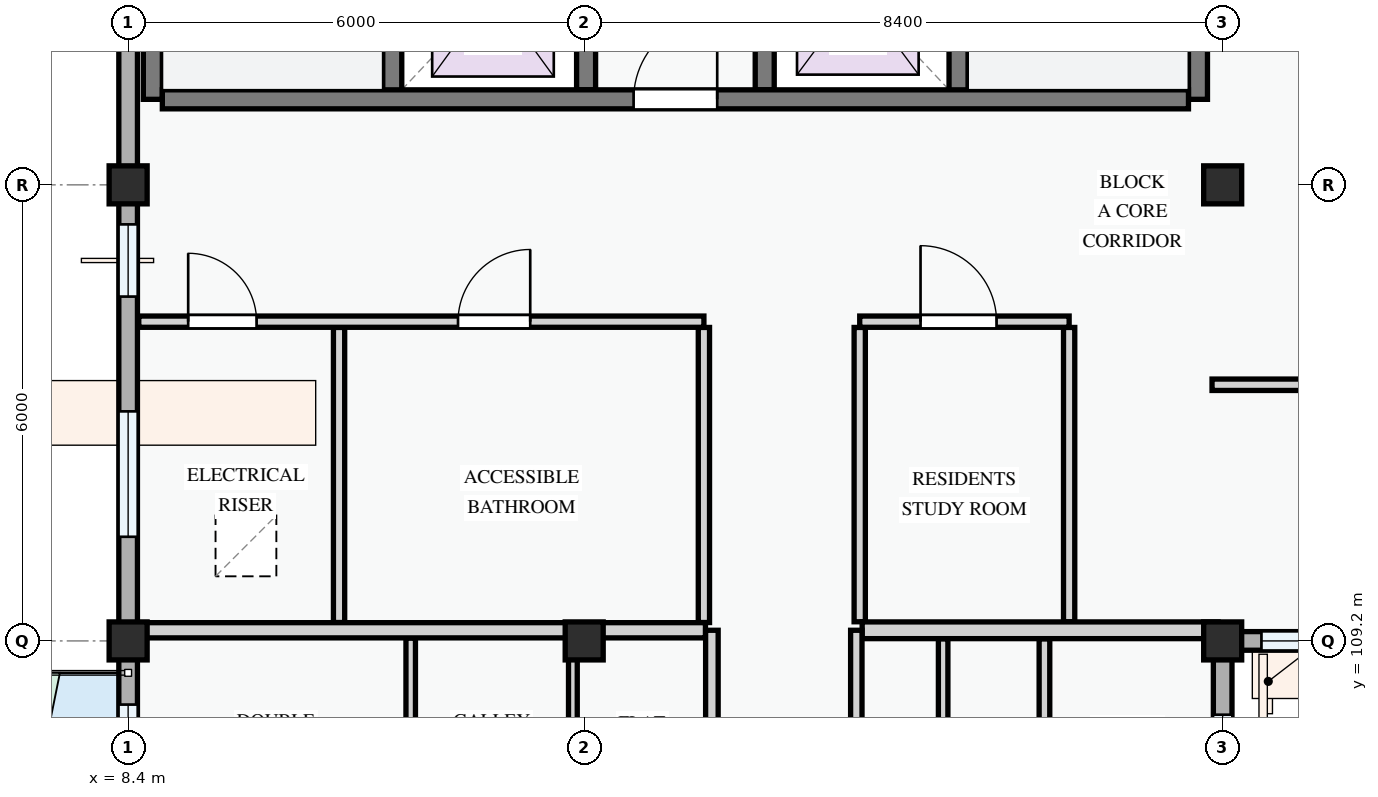
"""IFC4 building model, lengths in metres.
Left out: names, types, materials, properties, quantities, classifications, styles, units other than length and angle.
Written with IfcOpenShell. Run it as: python <this file> out.ifc"""

import sys

from ifc_helpers import new_model, si_unit, direction, frame, frame_2d, origin, origin_2d, place, context, subcontext, project, spatial, rectangle, extrude, element, fill, save


model = new_model("IFC4")
c1 = context("Model", 3, precision=1e-05, world=origin(), true_north=direction((0.0, 1.0)))
c2 = subcontext(c1, "Body", "Model", "MODEL_VIEW")
j1 = project(units=[si_unit("LENGTHUNIT", "METRE"), si_unit("PLANEANGLEUNIT", "RADIAN")], contexts=[c1])
p1 = place(None, origin())
s1 = spatial("IfcSite", under=j1, at=p1, CompositionType="ELEMENT")
p2 = place(p1, origin())
s2 = spatial("IfcBuilding", under=s1, at=p2, CompositionType="ELEMENT")
p3 = place(p2, frame((0.0, 0.0, 41.1)))
s3 = spatial("IfcBuildingStorey", under=s2, at=p3, CompositionType="ELEMENT", Elevation=41.1)
for number, where, z_axis, x_axis in (
    (1, (8.4, 109.2, 0.0), (0.0, 0.0, 1.0), (1.0, 0.0, 0.0)),
    (2, (8.4, 115.2, 0.0), (0.0, 0.0, 1.0), (1.0, 0.0, 0.0)),
    (3, (14.4, 109.2, 0.0), (0.0, 0.0, 1.0), (1.0, 0.0, 0.0)),
    (4, (22.8, 109.2, 0.0), (0.0, 0.0, 1.0), (1.0, 0.0, 0.0)),
    (5, (22.8, 115.2, 0.0), (0.0, 0.0, 1.0), (1.0, 0.0, 0.0)),
):
    element("IfcColumn", number, at=place(p3, frame(where, z_axis=z_axis, x_axis=x_axis)), inside=s3, PredefinedType="COLUMN", context=c2, shape_type="SweptSolid", body=[
        extrude(rectangle(XDim=0.5, YDim=0.5, at=origin_2d()), origin(), (0.0, 0.0, 1.0), 3.3),
    ])
p4 = place(p3, frame((22.8, 109.2, 0.0), z_axis=(0.0, 0.0, 1.0), x_axis=(1.0, 0.0, 0.0)))
e6 = element("IfcWall", 6, at=p4, inside=s3, PredefinedType="STANDARD", context=c2, shape_type="SweptSolid", body=[
    extrude(rectangle(XDim=6.0, YDim=0.245, at=frame_2d((3.0, 0.0))), origin(), (0.0, 0.0, 1.0), 2.525),
])
p5 = place(p4, frame((0.51, 0.0, 0.78)))
e7 = element("IfcOpeningElement", 7, at=p5, cuts=e6, PredefinedType="OPENING", context=c2, shape_type="SweptSolid", body=[
    extrude(rectangle(XDim=1.52, YDim=1.42, at=frame_2d((0.76, 0.71))), frame((0.0, 0.133, 0.0), z_axis=(0.0, -1.0, 0.0), x_axis=(1.0, 0.0, 0.0)), (0.0, 0.0, 1.0), 0.265),
])
p6 = place(p4, frame((2.955, 0.0, 0.78)))
e8 = element("IfcOpeningElement", 8, at=p6, cuts=e6, PredefinedType="OPENING", context=c2, shape_type="SweptSolid", body=[
    extrude(rectangle(XDim=2.25, YDim=1.6, at=frame_2d((1.125, 0.8))), frame((0.0, 0.133, 0.0), z_axis=(0.0, -1.0, 0.0), x_axis=(1.0, 0.0, 0.0)), (0.0, 0.0, 1.0), 0.265),
])
p7 = place(p3, frame((8.4, 123.6, 0.0), z_axis=(0.0, 0.0, 1.0), x_axis=(0.0, -1.0, 0.0)))
e9 = element("IfcWall", 9, at=p7, inside=s3, PredefinedType="STANDARD", context=c2, shape_type="SweptSolid", body=[
    extrude(rectangle(XDim=8.4, YDim=0.245, at=frame_2d((4.2, 0.0))), origin(), (0.0, 0.0, 1.0), 2.345),
])
p8 = place(p7, frame((1.296, 0.0, 0.78)))
e10 = element("IfcOpeningElement", 10, at=p8, cuts=e9, PredefinedType="OPENING", context=c2, shape_type="SweptSolid", body=[
    extrude(rectangle(XDim=1.4, YDim=1.45, at=frame_2d((0.7, 0.725))), frame((0.0, 0.133, 0.0), z_axis=(0.0, -1.0, 0.0), x_axis=(1.0, 0.0, 0.0)), (0.0, 0.0, 1.0), 0.265),
])
p9 = place(p7, frame((4.844, 0.0, 0.78)))
e11 = element("IfcOpeningElement", 11, at=p9, cuts=e9, PredefinedType="OPENING", context=c2, shape_type="SweptSolid", body=[
    extrude(rectangle(XDim=1.25, YDim=1.45, at=frame_2d((0.625, 0.725))), frame((0.0, 0.133, 0.0), z_axis=(0.0, -1.0, 0.0), x_axis=(1.0, 0.0, 0.0)), (0.0, 0.0, 1.0), 0.265),
])
p10 = place(p3, frame((8.4, 115.2, 0.0), z_axis=(0.0, 0.0, 1.0), x_axis=(0.0, -1.0, 0.0)))
e12 = element("IfcWall", 12, at=p10, inside=s3, PredefinedType="STANDARD", context=c2, shape_type="SweptSolid", body=[
    extrude(rectangle(XDim=6.0, YDim=0.245, at=frame_2d((3.0, 0.0))), origin(), (0.0, 0.0, 1.0), 2.445),
])
p11 = place(p10, frame((0.52, 0.0, 0.78)))
e13 = element("IfcOpeningElement", 13, at=p11, cuts=e12, PredefinedType="OPENING", context=c2, shape_type="SweptSolid", body=[
    extrude(rectangle(XDim=0.95, YDim=1.15, at=frame_2d((0.475, 0.575))), frame((0.0, 0.133, 0.0), z_axis=(0.0, -1.0, 0.0), x_axis=(1.0, 0.0, 0.0)), (0.0, 0.0, 1.0), 0.265),
])
p12 = place(p10, frame((2.98, 0.0, 0.78)))
e14 = element("IfcOpeningElement", 14, at=p12, cuts=e12, PredefinedType="OPENING", context=c2, shape_type="SweptSolid", body=[
    extrude(rectangle(XDim=1.65, YDim=1.5, at=frame_2d((0.825, 0.75))), frame((0.0, 0.133, 0.0), z_axis=(0.0, -1.0, 0.0), x_axis=(1.0, 0.0, 0.0)), (0.0, 0.0, 1.0), 0.265),
])
p13 = place(p3, frame((8.4, 109.2, 0.0), z_axis=(0.0, 0.0, 1.0), x_axis=(0.0, -1.0, 0.0)))
e15 = element("IfcWall", 15, at=p13, inside=s3, PredefinedType="STANDARD", context=c2, shape_type="SweptSolid", body=[
    extrude(rectangle(XDim=8.4, YDim=0.245, at=frame_2d((4.2, 0.0))), origin(), (0.0, 0.0, 1.0), 2.345),
])
p14 = place(p13, frame((3.595, 0.0, 0.0)))
e16 = element("IfcOpeningElement", 16, at=p14, cuts=e15, PredefinedType="OPENING", context=c2, shape_type="SweptSolid", body=[
    extrude(rectangle(XDim=1.05, YDim=2.15, at=frame_2d((0.525, 1.075))), frame((0.0, 0.133, 0.0), z_axis=(0.0, -1.0, 0.0), x_axis=(1.0, 0.0, 0.0)), (0.0, 0.0, 1.0), 0.265),
])
p15 = place(p13, frame((0.837, 0.0, 0.78)))
e17 = element("IfcOpeningElement", 17, at=p15, cuts=e15, PredefinedType="OPENING", context=c2, shape_type="SweptSolid", body=[
    extrude(rectangle(XDim=1.78, YDim=1.42, at=frame_2d((0.89, 0.71))), frame((0.0, 0.133, 0.0), z_axis=(0.0, -1.0, 0.0), x_axis=(1.0, 0.0, 0.0)), (0.0, 0.0, 1.0), 0.265),
])
p16 = place(p13, frame((5.133, 0.0, 0.78)))
e18 = element("IfcOpeningElement", 18, at=p16, cuts=e15, PredefinedType="OPENING", context=c2, shape_type="SweptSolid", body=[
    extrude(rectangle(XDim=1.1, YDim=1.3, at=frame_2d((0.55, 0.65))), frame((0.0, 0.133, 0.0), z_axis=(0.0, -1.0, 0.0), x_axis=(1.0, 0.0, 0.0)), (0.0, 0.0, 1.0), 0.265),
])
p17 = place(p13, frame((6.99, 0.0, 0.78)))
e19 = element("IfcOpeningElement", 19, at=p17, cuts=e15, PredefinedType="OPENING", context=c2, shape_type="SweptSolid", body=[
    extrude(rectangle(XDim=0.9, YDim=1.2, at=frame_2d((0.45, 0.6))), frame((0.0, 0.133, 0.0), z_axis=(0.0, -1.0, 0.0), x_axis=(1.0, 0.0, 0.0)), (0.0, 0.0, 1.0), 0.265),
])
p18 = place(p3, frame((22.8, 100.8, 0.0), z_axis=(0.0, 0.0, 1.0), x_axis=(0.0, 1.0, 0.0)))
e20 = element("IfcWall", 20, at=p18, inside=s3, PredefinedType="STANDARD", context=c2, shape_type="SweptSolid", body=[
    extrude(rectangle(XDim=8.4, YDim=0.245, at=frame_2d((4.2, 0.0))), origin(), (0.0, 0.0, 1.0), 2.425),
])
p19 = place(p18, frame((0.51, 0.0, 0.78)))
e21 = element("IfcOpeningElement", 21, at=p19, cuts=e20, PredefinedType="OPENING", context=c2, shape_type="SweptSolid", body=[
    extrude(rectangle(XDim=0.9, YDim=1.2, at=frame_2d((0.45, 0.6))), frame((0.0, 0.133, 0.0), z_axis=(0.0, -1.0, 0.0), x_axis=(1.0, 0.0, 0.0)), (0.0, 0.0, 1.0), 0.265),
])
p20 = place(p18, frame((2.764, 0.0, 0.78)))
e22 = element("IfcOpeningElement", 22, at=p20, cuts=e20, PredefinedType="OPENING", context=c2, shape_type="SweptSolid", body=[
    extrude(rectangle(XDim=1.2, YDim=1.5, at=frame_2d((0.6, 0.75))), frame((0.0, 0.133, 0.0), z_axis=(0.0, -1.0, 0.0), x_axis=(1.0, 0.0, 0.0)), (0.0, 0.0, 1.0), 0.265),
])
p21 = place(p18, frame((5.779, 0.0, 0.78)))
e23 = element("IfcOpeningElement", 23, at=p21, cuts=e20, PredefinedType="OPENING", context=c2, shape_type="SweptSolid", body=[
    extrude(rectangle(XDim=1.65, YDim=1.5, at=frame_2d((0.825, 0.75))), frame((0.0, 0.133, 0.0), z_axis=(0.0, -1.0, 0.0), x_axis=(1.0, 0.0, 0.0)), (0.0, 0.0, 1.0), 0.265),
])
p22 = place(p3, frame((11.875, 123.25, 0.0), z_axis=(0.0, 0.0, 1.0), x_axis=(0.0, -1.0, 0.0)))
e24 = element("IfcWall", 24, at=p22, inside=s3, PredefinedType="SHEAR", context=c2, shape_type="SweptSolid", body=[
    extrude(rectangle(XDim=6.925, YDim=0.25, at=frame_2d((3.462, 0.0))), origin(), (0.0, 0.0, 1.0), 3.0),
])
p23 = place(p22, frame((0.35, 0.0, 0.0)))
e25 = element("IfcOpeningElement", 25, at=p23, cuts=e24, PredefinedType="OPENING", context=c2, shape_type="SweptSolid", body=[
    extrude(rectangle(XDim=0.95, YDim=2.1, at=frame_2d((0.475, 1.05))), frame((0.0, 0.135, 0.0), z_axis=(0.0, -1.0, 0.0), x_axis=(1.0, 0.0, 0.0)), (0.0, 0.0, 1.0), 0.27),
])
p24 = place(p3, frame((8.725, 123.4, 0.0), z_axis=(0.0, 0.0, 1.0), x_axis=(0.0, -1.0, 0.0)))
e26 = element("IfcWall", 26, at=p24, inside=s3, PredefinedType="SHEAR", context=c2, shape_type="SweptSolid", body=[
    extrude(rectangle(XDim=7.075, YDim=0.25, at=frame_2d((3.538, 0.0))), origin(), (0.0, 0.0, 1.0), 3.0),
])
p25 = place(p3, frame((22.475, 123.25, 0.0), z_axis=(0.0, 0.0, 1.0), x_axis=(0.0, -1.0, 0.0)))
e27 = element("IfcWall", 27, at=p25, inside=s3, PredefinedType="SHEAR", context=c2, shape_type="SweptSolid", body=[
    extrude(rectangle(XDim=6.925, YDim=0.25, at=frame_2d((3.462, 0.0))), origin(), (0.0, 0.0, 1.0), 3.0),
])
p26 = place(p3, frame((19.325, 123.25, 0.0), z_axis=(0.0, 0.0, 1.0), x_axis=(0.0, -1.0, 0.0)))
e28 = element("IfcWall", 28, at=p26, inside=s3, PredefinedType="SHEAR", context=c2, shape_type="SweptSolid", body=[
    extrude(rectangle(XDim=6.925, YDim=0.25, at=frame_2d((3.462, 0.0))), origin(), (0.0, 0.0, 1.0), 3.0),
])
p27 = place(p26, frame((0.35, 0.0, 0.0)))
e29 = element("IfcOpeningElement", 29, at=p27, cuts=e28, PredefinedType="OPENING", context=c2, shape_type="SweptSolid", body=[
    extrude(rectangle(XDim=0.95, YDim=2.1, at=frame_2d((0.475, 1.05))), frame((0.0, 0.135, 0.0), z_axis=(0.0, -1.0, 0.0), x_axis=(1.0, 0.0, 0.0)), (0.0, 0.0, 1.0), 0.27),
])
for number, where, z_axis, x_axis in (
    (30, (14.425, 118.875, 0.0), (0.0, 0.0, 1.0), (0.0, -1.0, 0.0)),
    (31, (16.775, 118.875, 0.0), (0.0, 0.0, 1.0), (0.0, -1.0, 0.0)),
):
    element("IfcWall", number, at=place(p3, frame(where, z_axis=z_axis, x_axis=x_axis)), inside=s3, PredefinedType="SHEAR", context=c2, shape_type="SweptSolid", body=[
        extrude(rectangle(XDim=2.425, YDim=0.25, at=frame_2d((1.212, 0.0))), origin(), (0.0, 0.0, 1.0), 3.0),
    ])
p28 = place(p3, frame((8.85, 116.325, 0.0), z_axis=(0.0, 0.0, 1.0), x_axis=(1.0, 0.0, 0.0)))
e32 = element("IfcWall", 32, at=p28, inside=s3, PredefinedType="SHEAR", context=c2, shape_type="SweptSolid", body=[
    extrude(rectangle(XDim=13.5, YDim=0.25, at=frame_2d((6.75, 0.0))), origin(), (0.0, 0.0, 1.0), 3.0),
])
p29 = place(p28, frame((6.2, 0.0, 0.0)))
e33 = element("IfcOpeningElement", 33, at=p29, cuts=e32, PredefinedType="OPENING", context=c2, shape_type="SweptSolid", body=[
    extrude(rectangle(XDim=1.1, YDim=2.15, at=frame_2d((0.55, 1.075))), frame((0.0, 0.135, 0.0), z_axis=(0.0, -1.0, 0.0), x_axis=(1.0, 0.0, 0.0)), (0.0, 0.0, 1.0), 0.27),
])
for number, where, z_axis, x_axis in (
    (34, (11.175, 113.324, 0.0), (0.0, 0.0, 1.0), (0.0, -1.0, 0.0)),
    (35, (15.975, 113.324, 0.0), (0.0, 0.0, 1.0), (0.0, -1.0, 0.0)),
):
    element("IfcWall", number, at=place(p3, frame(where, z_axis=z_axis, x_axis=x_axis)), inside=s3, PredefinedType="PARTITIONING", context=c2, shape_type="SweptSolid", body=[
        extrude(rectangle(XDim=3.882, YDim=0.148, at=frame_2d((1.941, 0.0))), origin(), (0.0, 0.0, 1.0), 3.0),
    ])
for number, where, z_axis, x_axis in (
    (36, (18.025, 113.324, 0.0), (0.0, 0.0, 1.0), (0.0, -1.0, 0.0)),
    (37, (20.78, 113.324, 0.0), (0.0, 0.0, 1.0), (0.0, -1.0, 0.0)),
):
    element("IfcWall", number, at=place(p3, frame(where, z_axis=z_axis, x_axis=x_axis)), inside=s3, PredefinedType="PARTITIONING", context=c2, shape_type="SweptSolid", body=[
        extrude(rectangle(XDim=3.872, YDim=0.148, at=frame_2d((1.936, 0.0))), origin(), (0.0, 0.0, 1.0), 3.0),
    ])
p30 = place(p3, frame((8.54, 113.4, 0.0), z_axis=(0.0, 0.0, 1.0), x_axis=(1.0, 0.0, 0.0)))
e38 = element("IfcWall", 38, at=p30, inside=s3, PredefinedType="PARTITIONING", context=c2, shape_type="SweptSolid", body=[
    extrude(rectangle(XDim=7.435, YDim=0.148, at=frame_2d((3.718, 0.0))), origin(), (0.0, 0.0, 1.0), 3.0),
])
p31 = place(p30, frame((0.65, 0.0, 0.0)))
e39 = element("IfcOpeningElement", 39, at=p31, cuts=e38, PredefinedType="OPENING", context=c2, shape_type="SweptSolid", body=[
    extrude(rectangle(XDim=0.9, YDim=2.1, at=frame_2d((0.45, 1.05))), frame((0.0, 0.084, 0.0), z_axis=(0.0, -1.0, 0.0), x_axis=(1.0, 0.0, 0.0)), (0.0, 0.0, 1.0), 0.168),
])
p32 = place(p30, frame((4.2, 0.0, 0.0)))
e40 = element("IfcOpeningElement", 40, at=p32, cuts=e38, PredefinedType="OPENING", context=c2, shape_type="SweptSolid", body=[
    extrude(rectangle(XDim=0.95, YDim=2.1, at=frame_2d((0.475, 1.05))), frame((0.0, 0.084, 0.0), z_axis=(0.0, -1.0, 0.0), x_axis=(1.0, 0.0, 0.0)), (0.0, 0.0, 1.0), 0.168),
])
p33 = place(p3, frame((18.025, 113.4, 0.0), z_axis=(0.0, 0.0, 1.0), x_axis=(1.0, 0.0, 0.0)))
e41 = element("IfcWall", 41, at=p33, inside=s3, PredefinedType="PARTITIONING", context=c2, shape_type="SweptSolid", body=[
    extrude(rectangle(XDim=2.755, YDim=0.148, at=frame_2d((1.377, 0.0))), origin(), (0.0, 0.0, 1.0), 3.0),
])
p34 = place(p33, frame((0.8, 0.0, 0.0)))
e42 = element("IfcOpeningElement", 42, at=p34, cuts=e41, PredefinedType="OPENING", context=c2, shape_type="SweptSolid", body=[
    extrude(rectangle(XDim=1.0, YDim=2.15, at=frame_2d((0.5, 1.075))), frame((0.0, 0.084, 0.0), z_axis=(0.0, -1.0, 0.0), x_axis=(1.0, 0.0, 0.0)), (0.0, 0.0, 1.0), 0.168),
])
p35 = place(p3, frame((22.66, 112.57, 0.0), z_axis=(0.0, 0.0, 1.0), x_axis=(1.0, 0.0, 0.0)))
e43 = element("IfcWall", 43, at=p35, inside=s3, PredefinedType="PARTITIONING", context=c2, shape_type="SweptSolid", body=[
    extrude(rectangle(XDim=2.406, YDim=0.15, at=frame_2d((1.203, 0.0))), origin(), (0.0, 0.0, 1.0), 3.0),
])
p36 = place(p3, frame((12.118, 106.007, 0.0), z_axis=(0.0, 0.0, 1.0), x_axis=(0.0, 1.0, 0.0)))
e44 = element("IfcWall", 44, at=p36, inside=s3, PredefinedType="PARTITIONING", context=c2, shape_type="SweptSolid", body=[
    extrude(rectangle(XDim=3.231, YDim=0.125, at=frame_2d((1.615, 0.0))), origin(), (0.0, 0.0, 1.0), 3.0),
])
p37 = place(p3, frame((14.251, 106.007, 0.0), z_axis=(0.0, 0.0, 1.0), x_axis=(0.0, 1.0, 0.0)))
e45 = element("IfcWall", 45, at=p37, inside=s3, PredefinedType="PARTITIONING", context=c2, shape_type="SweptSolid", body=[
    extrude(rectangle(XDim=3.231, YDim=0.115, at=frame_2d((1.615, 0.0))), origin(), (0.0, 0.0, 1.0), 2.425),
])
p38 = place(p3, frame((20.455, 105.851, 0.0), z_axis=(0.0, 0.0, 1.0), x_axis=(0.0, 1.0, 0.0)))
e46 = element("IfcWall", 46, at=p38, inside=s3, PredefinedType="PARTITIONING", context=c2, shape_type="SweptSolid", body=[
    extrude(rectangle(XDim=3.377, YDim=0.14, at=frame_2d((1.688, 0.0))), origin(), (0.0, 0.0, 1.0), 3.0),
])
p39 = place(p3, frame((19.122, 105.851, 0.0), z_axis=(0.0, 0.0, 1.0), x_axis=(0.0, 1.0, 0.0)))
e47 = element("IfcWall", 47, at=p39, inside=s3, PredefinedType="PARTITIONING", context=c2, shape_type="SweptSolid", body=[
    extrude(rectangle(XDim=3.377, YDim=0.125, at=frame_2d((1.688, 0.0))), origin(), (0.0, 0.0, 1.0), 3.0),
])
p40 = place(p3, frame((8.524, 109.34, 0.0), z_axis=(0.0, 0.0, 1.0), x_axis=(1.0, 0.0, 0.0)))
e48 = element("IfcWall", 48, at=p40, inside=s3, PredefinedType="PARTITIONING", context=c2, shape_type="SweptSolid", body=[
    extrude(rectangle(XDim=7.471, YDim=0.2, at=frame_2d((3.736, 0.0))), origin(), (0.0, 0.0, 1.0), 2.375),
])
p41 = place(p3, frame((18.057, 109.34, 0.0), z_axis=(0.0, 0.0, 1.0), x_axis=(1.0, 0.0, 0.0)))
e49 = element("IfcWall", 49, at=p41, inside=s3, PredefinedType="PARTITIONING", context=c2, shape_type="SweptSolid", body=[
    extrude(rectangle(XDim=4.683, YDim=0.22, at=frame_2d((2.342, 0.0))), origin(), (0.0, 0.0, 1.0), 2.375),
])
p42 = place(p3, frame((16.08, 86.524, 0.0), z_axis=(0.0, 0.0, 1.0), x_axis=(0.0, 1.0, 0.0)))
e50 = element("IfcWall", 50, at=p42, inside=s3, PredefinedType="PARTITIONING", context=c2, shape_type="SweptSolid", body=[
    extrude(rectangle(XDim=22.816, YDim=0.165, at=frame_2d((11.408, 0.0))), origin(), (0.0, 0.0, 1.0), 3.0),
])
p43 = place(p42, frame((2.035, 0.0, 0.0)))
e51 = element("IfcOpeningElement", 51, at=p43, cuts=e50, PredefinedType="OPENING", context=c2, shape_type="SweptSolid", body=[
    extrude(rectangle(XDim=0.92, YDim=2.1, at=frame_2d((0.46, 1.05))), frame((0.0, 0.093, 0.0), z_axis=(0.0, -1.0, 0.0), x_axis=(1.0, 0.0, 0.0)), (0.0, 0.0, 1.0), 0.185),
])
p44 = place(p42, frame((10.071, 0.0, 0.0)))
e52 = element("IfcOpeningElement", 52, at=p44, cuts=e50, PredefinedType="OPENING", context=c2, shape_type="SweptSolid", body=[
    extrude(rectangle(XDim=0.96, YDim=2.12, at=frame_2d((0.48, 1.06))), frame((0.0, 0.093, 0.0), z_axis=(0.0, -1.0, 0.0), x_axis=(1.0, 0.0, 0.0)), (0.0, 0.0, 1.0), 0.185),
])
p45 = place(p42, frame((18.018, 0.0, 0.0)))
e53 = element("IfcOpeningElement", 53, at=p45, cuts=e50, PredefinedType="OPENING", context=c2, shape_type="SweptSolid", body=[
    extrude(rectangle(XDim=0.92, YDim=2.1, at=frame_2d((0.46, 1.05))), frame((0.0, 0.093, 0.0), z_axis=(0.0, -1.0, 0.0), x_axis=(1.0, 0.0, 0.0)), (0.0, 0.0, 1.0), 0.185),
])
p46 = place(p3, frame((17.98, 86.524, 0.0), z_axis=(0.0, 0.0, 1.0), x_axis=(0.0, 1.0, 0.0)))
e54 = element("IfcWall", 54, at=p46, inside=s3, PredefinedType="PARTITIONING", context=c2, shape_type="SweptSolid", body=[
    extrude(rectangle(XDim=22.816, YDim=0.15, at=frame_2d((11.408, 0.0))), origin(), (0.0, 0.0, 1.0), 3.0),
])
p47 = place(p46, frame((1.903, 0.0, 0.0)))
e55 = element("IfcOpeningElement", 55, at=p47, cuts=e54, PredefinedType="OPENING", context=c2, shape_type="SweptSolid", body=[
    extrude(rectangle(XDim=0.92, YDim=2.1, at=frame_2d((0.46, 1.05))), frame((0.0, 0.085, 0.0), z_axis=(0.0, -1.0, 0.0), x_axis=(1.0, 0.0, 0.0)), (0.0, 0.0, 1.0), 0.17),
])
p48 = place(p46, frame((9.882, 0.0, 0.0)))
e56 = element("IfcOpeningElement", 56, at=p48, cuts=e54, PredefinedType="OPENING", context=c2, shape_type="SweptSolid", body=[
    extrude(rectangle(XDim=0.92, YDim=2.1, at=frame_2d((0.46, 1.05))), frame((0.0, 0.085, 0.0), z_axis=(0.0, -1.0, 0.0), x_axis=(1.0, 0.0, 0.0)), (0.0, 0.0, 1.0), 0.17),
])
p49 = place(p46, frame((18.008, 0.0, 0.0)))
e57 = element("IfcOpeningElement", 57, at=p49, cuts=e54, PredefinedType="OPENING", context=c2, shape_type="SweptSolid", body=[
    extrude(rectangle(XDim=0.92, YDim=2.1, at=frame_2d((0.46, 1.05))), frame((0.0, 0.085, 0.0), z_axis=(0.0, -1.0, 0.0), x_axis=(1.0, 0.0, 0.0)), (0.0, 0.0, 1.0), 0.17),
])
p50 = place(p5, origin())
e58 = element("IfcWindow", 58, at=p50, inside=s3, PartitioningType="SINGLE_PANEL", PredefinedType="WINDOW", context=c2, shape_type="SweptSolid", body=[
    extrude(rectangle(XDim=1.52, YDim=1.42, at=frame_2d((0.76, 0.71))), frame((0.0, 0.03, 0.0), z_axis=(0.0, -1.0, 0.0), x_axis=(1.0, 0.0, 0.0)), (0.0, 0.0, 1.0), 0.06),
])
fill(e7, e58)
p51 = place(p11, origin())
e59 = element("IfcWindow", 59, at=p51, inside=s3, PartitioningType="SINGLE_PANEL", PredefinedType="WINDOW", context=c2, shape_type="SweptSolid", body=[
    extrude(rectangle(XDim=0.95, YDim=1.15, at=frame_2d((0.475, 0.575))), frame((0.0, 0.03, 0.0), z_axis=(0.0, -1.0, 0.0), x_axis=(1.0, 0.0, 0.0)), (0.0, 0.0, 1.0), 0.06),
])
fill(e13, e59)
p52 = place(p12, origin())
e60 = element("IfcWindow", 60, at=p52, inside=s3, PartitioningType="DOUBLE_PANEL_VERTICAL", PredefinedType="WINDOW", context=c2, shape_type="SweptSolid", body=[
    extrude(rectangle(XDim=1.65, YDim=1.5, at=frame_2d((0.825, 0.75))), frame((0.0, 0.03, 0.0), z_axis=(0.0, -1.0, 0.0), x_axis=(1.0, 0.0, 0.0)), (0.0, 0.0, 1.0), 0.06),
])
fill(e14, e60)
p53 = place(p15, origin())
e61 = element("IfcWindow", 61, at=p53, inside=s3, PartitioningType="DOUBLE_PANEL_VERTICAL", PredefinedType="WINDOW", context=c2, shape_type="SweptSolid", body=[
    extrude(rectangle(XDim=1.78, YDim=1.42, at=frame_2d((0.89, 0.71))), frame((0.0, 0.03, 0.0), z_axis=(0.0, -1.0, 0.0), x_axis=(1.0, 0.0, 0.0)), (0.0, 0.0, 1.0), 0.06),
])
fill(e17, e61)
p54 = place(p21, origin())
e62 = element("IfcWindow", 62, at=p54, inside=s3, PartitioningType="DOUBLE_PANEL_VERTICAL", PredefinedType="WINDOW", context=c2, shape_type="SweptSolid", body=[
    extrude(rectangle(XDim=1.65, YDim=1.5, at=frame_2d((0.825, 0.75))), frame((0.0, 0.03, 0.0), z_axis=(0.0, -1.0, 0.0), x_axis=(1.0, 0.0, 0.0)), (0.0, 0.0, 1.0), 0.06),
])
fill(e23, e62)
p55 = place(p29, origin())
e63 = element("IfcDoor", 63, at=p55, inside=s3, OperationType="SINGLE_SWING_RIGHT", PredefinedType="DOOR", context=c2, shape_type="SweptSolid", body=[
    extrude(rectangle(XDim=1.1, YDim=2.15, at=frame_2d((0.55, 1.075))), frame((0.0, 0.025, 0.0), z_axis=(0.0, -1.0, 0.0), x_axis=(1.0, 0.0, 0.0)), (0.0, 0.0, 1.0), 0.05),
])
fill(e33, e63)
p56 = place(p31, origin())
e64 = element("IfcDoor", 64, at=p56, inside=s3, OperationType="SINGLE_SWING_LEFT", PredefinedType="DOOR", context=c2, shape_type="SweptSolid", body=[
    extrude(rectangle(XDim=0.9, YDim=2.1, at=frame_2d((0.45, 1.05))), frame((0.0, 0.025, 0.0), z_axis=(0.0, -1.0, 0.0), x_axis=(1.0, 0.0, 0.0)), (0.0, 0.0, 1.0), 0.05),
])
fill(e39, e64)
p57 = place(p32, origin())
e65 = element("IfcDoor", 65, at=p57, inside=s3, OperationType="SINGLE_SWING_RIGHT", PredefinedType="DOOR", context=c2, shape_type="SweptSolid", body=[
    extrude(rectangle(XDim=0.95, YDim=2.1, at=frame_2d((0.475, 1.05))), frame((0.0, 0.025, 0.0), z_axis=(0.0, -1.0, 0.0), x_axis=(1.0, 0.0, 0.0)), (0.0, 0.0, 1.0), 0.05),
])
fill(e40, e65)
p58 = place(p34, origin())
e66 = element("IfcDoor", 66, at=p58, inside=s3, OperationType="SINGLE_SWING_LEFT", PredefinedType="DOOR", context=c2, shape_type="SweptSolid", body=[
    extrude(rectangle(XDim=1.0, YDim=2.15, at=frame_2d((0.5, 1.075))), frame((0.0, 0.025, 0.0), z_axis=(0.0, -1.0, 0.0), x_axis=(1.0, 0.0, 0.0)), (0.0, 0.0, 1.0), 0.05),
])
fill(e42, e66)
save(model, sys.argv[1])
